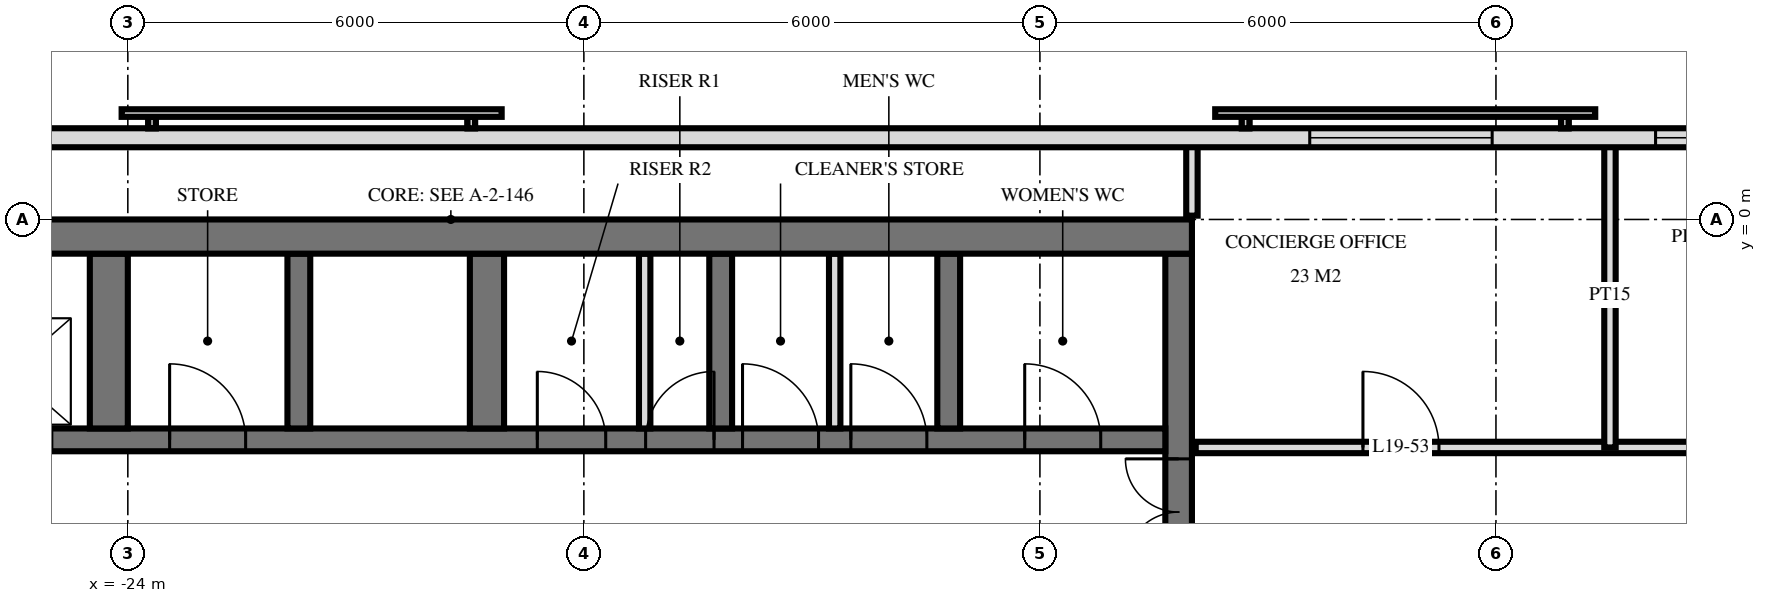
"""IFC4 building model, lengths in metres.
Left out: names, types, materials, properties, quantities, classifications, styles, units other than length and angle.
Written with IfcOpenShell. Run it as: python <this file> out.ifc"""

import sys

from ifc_helpers import new_model, si_unit, direction, frame, frame_2d, origin, place, context, subcontext, project, spatial, rectangle, extrude, element, fill, save


model = new_model("IFC4")
c1 = context("Model", 3, precision=1e-05, world=origin(), true_north=direction((0.0, 1.0)))
c2 = subcontext(c1, "Body", "Model", "MODEL_VIEW")
j1 = project(units=[si_unit("LENGTHUNIT", "METRE"), si_unit("PLANEANGLEUNIT", "RADIAN")], contexts=[c1])
p1 = place(None, origin())
s1 = spatial("IfcSite", under=j1, at=p1, CompositionType="ELEMENT")
p2 = place(p1, origin())
s2 = spatial("IfcBuilding", under=s1, at=p2, CompositionType="ELEMENT")
p3 = place(p2, frame((0.0, 0.0, 78.0)))
s3 = spatial("IfcBuildingStorey", under=s2, at=p3, CompositionType="ELEMENT", Elevation=78.0)
p4 = place(p3, frame((-29.5, -0.225, 0.0), z_axis=(0.0, 0.0, 1.0), x_axis=(1.0, 0.0, 0.0)))
e1 = element("IfcWall", 1, at=p4, inside=s3, PredefinedType="SHEAR", context=c2, shape_type="SweptSolid", body=[
    extrude(rectangle(XDim=19.5, YDim=0.45, at=frame_2d((9.75, 0.0))), origin(), (0.0, 0.0, 1.0), 3.6),
])
p5 = place(p3, frame((-10.175, -14.55, 0.0), z_axis=(0.0, 0.0, 1.0), x_axis=(0.0, 1.0, 0.0)))
e2 = element("IfcWall", 2, at=p5, inside=s3, PredefinedType="SHEAR", context=c2, shape_type="SweptSolid", body=[
    extrude(rectangle(XDim=14.1, YDim=0.35, at=frame_2d((7.05, 0.0))), origin(), (0.0, 0.0, 1.0), 3.6),
])
p6 = place(p5, frame((8.4, 0.0, 0.0)))
e3 = element("IfcOpeningElement", 3, at=p6, cuts=e2, PredefinedType="OPENING", context=c2, shape_type="SweptSolid", body=[
    extrude(rectangle(XDim=1.4, YDim=2.4, at=frame_2d((0.7, 1.2))), frame((0.0, 0.185, 0.0), z_axis=(0.0, -1.0, 0.0), x_axis=(1.0, 0.0, 0.0)), (0.0, 0.0, 1.0), 0.37),
])
p7 = place(p5, frame((10.0, 0.0, 0.0)))
e4 = element("IfcOpeningElement", 4, at=p7, cuts=e2, PredefinedType="OPENING", context=c2, shape_type="SweptSolid", body=[
    extrude(rectangle(XDim=1.4, YDim=2.4, at=frame_2d((0.7, 1.2))), frame((0.0, 0.185, 0.0), z_axis=(0.0, -1.0, 0.0), x_axis=(1.0, 0.0, 0.0)), (0.0, 0.0, 1.0), 0.37),
])
p8 = place(p5, frame((4.0, 0.0, 0.0)))
e5 = element("IfcOpeningElement", 5, at=p8, cuts=e2, PredefinedType="OPENING", context=c2, shape_type="SweptSolid", body=[
    extrude(rectangle(XDim=1.2, YDim=2.1, at=frame_2d((0.6, 1.05))), frame((0.0, 0.185, 0.0), z_axis=(0.0, -1.0, 0.0), x_axis=(1.0, 0.0, 0.0)), (0.0, 0.0, 1.0), 0.37),
])
p9 = place(p3, frame((-29.05, -2.9, 0.0), z_axis=(0.0, 0.0, 1.0), x_axis=(1.0, 0.0, 0.0)))
e6 = element("IfcWall", 6, at=p9, inside=s3, PredefinedType="SHEAR", context=c2, shape_type="SweptSolid", body=[
    extrude(rectangle(XDim=18.7, YDim=0.3, at=frame_2d((9.35, 0.0))), origin(), (0.0, 0.0, 1.0), 3.6),
])
p10 = place(p9, frame((2.95, 0.0, 0.0)))
e7 = element("IfcOpeningElement", 7, at=p10, cuts=e6, PredefinedType="OPENING", context=c2, shape_type="SweptSolid", body=[
    extrude(rectangle(XDim=1.1, YDim=2.1, at=frame_2d((0.55, 1.05))), frame((0.0, 0.16, 0.0), z_axis=(0.0, -1.0, 0.0), x_axis=(1.0, 0.0, 0.0)), (0.0, 0.0, 1.0), 0.32),
])
p11 = place(p9, frame((0.55, 0.0, 0.0)))
e8 = element("IfcOpeningElement", 8, at=p11, cuts=e6, PredefinedType="OPENING", context=c2, shape_type="SweptSolid", body=[
    extrude(rectangle(XDim=1.1, YDim=2.1, at=frame_2d((0.55, 1.05))), frame((0.0, 0.16, 0.0), z_axis=(0.0, -1.0, 0.0), x_axis=(1.0, 0.0, 0.0)), (0.0, 0.0, 1.0), 0.32),
])
p12 = place(p9, frame((11.863, 0.0, 0.0)))
e9 = element("IfcOpeningElement", 9, at=p12, cuts=e6, PredefinedType="OPENING", context=c2, shape_type="SweptSolid", body=[
    extrude(rectangle(XDim=0.9, YDim=2.1, at=frame_2d((0.45, 1.05))), frame((0.0, 0.16, 0.0), z_axis=(0.0, -1.0, 0.0), x_axis=(1.0, 0.0, 0.0)), (0.0, 0.0, 1.0), 0.32),
])
p13 = place(p9, frame((10.438, 0.0, 0.0)))
e10 = element("IfcOpeningElement", 10, at=p13, cuts=e6, PredefinedType="OPENING", context=c2, shape_type="SweptSolid", body=[
    extrude(rectangle(XDim=0.9, YDim=2.1, at=frame_2d((0.45, 1.05))), frame((0.0, 0.16, 0.0), z_axis=(0.0, -1.0, 0.0), x_axis=(1.0, 0.0, 0.0)), (0.0, 0.0, 1.0), 0.32),
])
p14 = place(p9, frame((16.85, 0.0, 0.0)))
e11 = element("IfcOpeningElement", 11, at=p14, cuts=e6, PredefinedType="OPENING", context=c2, shape_type="SweptSolid", body=[
    extrude(rectangle(XDim=1.0, YDim=2.1, at=frame_2d((0.5, 1.05))), frame((0.0, 0.16, 0.0), z_axis=(0.0, -1.0, 0.0), x_axis=(1.0, 0.0, 0.0)), (0.0, 0.0, 1.0), 0.32),
])
p15 = place(p9, frame((14.562, 0.0, 0.0)))
e12 = element("IfcOpeningElement", 12, at=p15, cuts=e6, PredefinedType="OPENING", context=c2, shape_type="SweptSolid", body=[
    extrude(rectangle(XDim=1.0, YDim=2.1, at=frame_2d((0.5, 1.05))), frame((0.0, 0.16, 0.0), z_axis=(0.0, -1.0, 0.0), x_axis=(1.0, 0.0, 0.0)), (0.0, 0.0, 1.0), 0.32),
])
p16 = place(p9, frame((13.137, 0.0, 0.0)))
e13 = element("IfcOpeningElement", 13, at=p16, cuts=e6, PredefinedType="OPENING", context=c2, shape_type="SweptSolid", body=[
    extrude(rectangle(XDim=1.0, YDim=2.1, at=frame_2d((0.5, 1.05))), frame((0.0, 0.16, 0.0), z_axis=(0.0, -1.0, 0.0), x_axis=(1.0, 0.0, 0.0)), (0.0, 0.0, 1.0), 0.32),
])
p17 = place(p9, frame((5.6, 0.0, 0.0)))
e14 = element("IfcOpeningElement", 14, at=p17, cuts=e6, PredefinedType="OPENING", context=c2, shape_type="SweptSolid", body=[
    extrude(rectangle(XDim=1.0, YDim=2.1, at=frame_2d((0.5, 1.05))), frame((0.0, 0.16, 0.0), z_axis=(0.0, -1.0, 0.0), x_axis=(1.0, 0.0, 0.0)), (0.0, 0.0, 1.0), 0.32),
])
for number, where, z_axis, x_axis in (
    (15, (-13.2, -2.75, 0.0), (0.0, 0.0, 1.0), (0.0, 1.0, 0.0)),
    (16, (-16.2, -2.75, 0.0), (0.0, 0.0, 1.0), (0.0, 1.0, 0.0)),
):
    element("IfcWall", number, at=place(p3, frame(where, z_axis=z_axis, x_axis=x_axis)), inside=s3, PredefinedType="SHEAR", context=c2, shape_type="SweptSolid", body=[
        extrude(rectangle(XDim=2.3, YDim=0.3, at=frame_2d((1.15, 0.0))), origin(), (0.0, 0.0, 1.0), 3.6),
    ])
p18 = place(p3, frame((-19.275, -2.75, 0.0), z_axis=(0.0, 0.0, 1.0), x_axis=(0.0, 1.0, 0.0)))
e17 = element("IfcWall", 17, at=p18, inside=s3, PredefinedType="SHEAR", context=c2, shape_type="SweptSolid", body=[
    extrude(rectangle(XDim=2.3, YDim=0.45, at=frame_2d((1.15, 0.0))), origin(), (0.0, 0.0, 1.0), 3.6),
])
p19 = place(p3, frame((-21.75, -2.75, 0.0), z_axis=(0.0, 0.0, 1.0), x_axis=(0.0, 1.0, 0.0)))
e18 = element("IfcWall", 18, at=p19, inside=s3, PredefinedType="SHEAR", context=c2, shape_type="SweptSolid", body=[
    extrude(rectangle(XDim=2.3, YDim=0.3, at=frame_2d((1.15, 0.0))), origin(), (0.0, 0.0, 1.0), 3.6),
])
p20 = place(p3, frame((-24.25, -2.75, 0.0), z_axis=(0.0, 0.0, 1.0), x_axis=(0.0, 1.0, 0.0)))
e19 = element("IfcWall", 19, at=p20, inside=s3, PredefinedType="SHEAR", context=c2, shape_type="SweptSolid", body=[
    extrude(rectangle(XDim=2.3, YDim=0.5, at=frame_2d((1.15, 0.0))), origin(), (0.0, 0.0, 1.0), 3.6),
])
p21 = place(p3, frame((28.775, 1.075, 0.0), z_axis=(0.0, 0.0, 1.0), x_axis=(-1.0, 0.0, 0.0)))
e20 = element("IfcWall", 20, at=p21, inside=s3, PredefinedType="SOLIDWALL", context=c2, shape_type="SweptSolid", body=[
    extrude(rectangle(XDim=57.551, YDim=0.25, at=frame_2d((28.775, 0.0))), origin(), (0.0, 0.0, 1.0), 3.32),
])
p22 = place(p21, frame((25.325, 0.0, 0.3)))
e21 = element("IfcOpeningElement", 21, at=p22, cuts=e20, PredefinedType="OPENING", context=c2, shape_type="SweptSolid", body=[
    extrude(rectangle(XDim=2.4, YDim=2.1, at=frame_2d((1.2, 1.05))), frame((0.0, 0.135, 0.0), z_axis=(0.0, -1.0, 0.0), x_axis=(1.0, 0.0, 0.0)), (0.0, 0.0, 1.0), 0.27),
])
p23 = place(p21, frame((30.275, 0.0, 0.3)))
e22 = element("IfcOpeningElement", 22, at=p23, cuts=e20, PredefinedType="OPENING", context=c2, shape_type="SweptSolid", body=[
    extrude(rectangle(XDim=2.4, YDim=2.1, at=frame_2d((1.2, 1.05))), frame((0.0, 0.135, 0.0), z_axis=(0.0, -1.0, 0.0), x_axis=(1.0, 0.0, 0.0)), (0.0, 0.0, 1.0), 0.27),
])
p24 = place(p21, frame((34.825, 0.0, 0.3)))
e23 = element("IfcOpeningElement", 23, at=p24, cuts=e20, PredefinedType="OPENING", context=c2, shape_type="SweptSolid", body=[
    extrude(rectangle(XDim=2.4, YDim=2.1, at=frame_2d((1.2, 1.05))), frame((0.0, 0.135, 0.0), z_axis=(0.0, -1.0, 0.0), x_axis=(1.0, 0.0, 0.0)), (0.0, 0.0, 1.0), 0.27),
])
for number, where, z_axis, x_axis in (
    (24, (-17.2, -2.75, 0.0), (0.0, 0.0, 1.0), (0.0, 1.0, 0.0)),
    (25, (-14.7, -2.75, 0.0), (0.0, 0.0, 1.0), (0.0, 1.0, 0.0)),
):
    element("IfcWall", number, at=place(p3, frame(where, z_axis=z_axis, x_axis=x_axis)), inside=s3, PredefinedType="PARTITIONING", context=c2, shape_type="SweptSolid", body=[
        extrude(rectangle(XDim=2.3, YDim=0.15, at=frame_2d((1.15, 0.0))), origin(), (0.0, 0.0, 1.0), 3.3),
    ])
p25 = place(p3, frame((-4.5, -3.0, 0.0), z_axis=(0.0, 0.0, 1.0), x_axis=(0.0, 1.0, 0.0)))
e26 = element("IfcWall", 26, at=p25, inside=s3, PredefinedType="PARTITIONING", context=c2, shape_type="SweptSolid", body=[
    extrude(rectangle(XDim=4.02, YDim=0.15, at=frame_2d((2.01, 0.0))), origin(), (0.0, 0.0, 1.0), 3.32),
])
p26 = place(p3, frame((-10.0, 0.05, 0.0), z_axis=(0.0, 0.0, 1.0), x_axis=(0.0, 1.0, 0.0)))
e27 = element("IfcWall", 27, at=p26, inside=s3, PredefinedType="PARTITIONING", context=c2, shape_type="SweptSolid", body=[
    extrude(rectangle(XDim=0.97, YDim=0.15, at=frame_2d((0.485, 0.0))), origin(), (0.0, 0.0, 1.0), 3.32),
])
p27 = place(p3, frame((-9.95, -3.0, 0.0), z_axis=(0.0, 0.0, 1.0), x_axis=(1.0, 0.0, 0.0)))
e28 = element("IfcWall", 28, at=p27, inside=s3, PredefinedType="PARTITIONING", context=c2, shape_type="SweptSolid", body=[
    extrude(rectangle(XDim=19.9, YDim=0.15, at=frame_2d((9.95, 0.0))), origin(), (0.0, 0.0, 1.0), 3.32),
])
p28 = place(p27, frame((2.2, 0.0, 0.0)))
e29 = element("IfcOpeningElement", 29, at=p28, cuts=e28, PredefinedType="OPENING", context=c2, shape_type="SweptSolid", body=[
    extrude(rectangle(XDim=1.0, YDim=2.1, at=frame_2d((0.5, 1.05))), frame((0.0, 0.085, 0.0), z_axis=(0.0, -1.0, 0.0), x_axis=(1.0, 0.0, 0.0)), (0.0, 0.0, 1.0), 0.17),
])
p29 = place(p27, frame((7.2, 0.0, 0.0)))
e30 = element("IfcOpeningElement", 30, at=p29, cuts=e28, PredefinedType="OPENING", context=c2, shape_type="SweptSolid", body=[
    extrude(rectangle(XDim=1.0, YDim=2.1, at=frame_2d((0.5, 1.05))), frame((0.0, 0.085, 0.0), z_axis=(0.0, -1.0, 0.0), x_axis=(1.0, 0.0, 0.0)), (0.0, 0.0, 1.0), 0.17),
])
p30 = place(p27, frame((11.7, 0.0, 0.0)))
e31 = element("IfcOpeningElement", 31, at=p30, cuts=e28, PredefinedType="OPENING", context=c2, shape_type="SweptSolid", body=[
    extrude(rectangle(XDim=1.0, YDim=2.1, at=frame_2d((0.5, 1.05))), frame((0.0, 0.085, 0.0), z_axis=(0.0, -1.0, 0.0), x_axis=(1.0, 0.0, 0.0)), (0.0, 0.0, 1.0), 0.17),
])
p31 = place(p27, frame((15.45, 0.0, 0.0)))
e32 = element("IfcOpeningElement", 32, at=p31, cuts=e28, PredefinedType="OPENING", context=c2, shape_type="SweptSolid", body=[
    extrude(rectangle(XDim=1.0, YDim=2.1, at=frame_2d((0.5, 1.05))), frame((0.0, 0.085, 0.0), z_axis=(0.0, -1.0, 0.0), x_axis=(1.0, 0.0, 0.0)), (0.0, 0.0, 1.0), 0.17),
])
p32 = place(p27, frame((18.2, 0.0, 0.0)))
e33 = element("IfcOpeningElement", 33, at=p32, cuts=e28, PredefinedType="OPENING", context=c2, shape_type="SweptSolid", body=[
    extrude(rectangle(XDim=1.0, YDim=2.1, at=frame_2d((0.5, 1.05))), frame((0.0, 0.085, 0.0), z_axis=(0.0, -1.0, 0.0), x_axis=(1.0, 0.0, 0.0)), (0.0, 0.0, 1.0), 0.17),
])
p33 = place(p23, origin())
e34 = element("IfcWindow", 34, at=p33, inside=s3, PartitioningType="SINGLE_PANEL", PredefinedType="WINDOW", context=c2, shape_type="SweptSolid", body=[
    extrude(rectangle(XDim=2.4, YDim=2.1, at=frame_2d((1.2, 1.05))), frame((0.0, 0.03, 0.0), z_axis=(0.0, -1.0, 0.0), x_axis=(1.0, 0.0, 0.0)), (0.0, 0.0, 1.0), 0.06),
])
fill(e22, e34)
p34 = place(p24, origin())
e35 = element("IfcWindow", 35, at=p34, inside=s3, PartitioningType="SINGLE_PANEL", PredefinedType="WINDOW", context=c2, shape_type="SweptSolid", body=[
    extrude(rectangle(XDim=2.4, YDim=2.1, at=frame_2d((1.2, 1.05))), frame((0.0, 0.03, 0.0), z_axis=(0.0, -1.0, 0.0), x_axis=(1.0, 0.0, 0.0)), (0.0, 0.0, 1.0), 0.06),
])
fill(e23, e35)
p35 = place(p7, origin())
e36 = element("IfcDoor", 36, at=p35, inside=s3, OperationType="DOUBLE_DOOR_SINGLE_SWING", PredefinedType="DOOR", context=c2, shape_type="SweptSolid", body=[
    extrude(rectangle(XDim=1.4, YDim=2.4, at=frame_2d((0.7, 1.2))), frame((0.0, 0.025, 0.0), z_axis=(0.0, -1.0, 0.0), x_axis=(1.0, 0.0, 0.0)), (0.0, 0.0, 1.0), 0.05),
])
fill(e4, e36)
p36 = place(p12, origin())
e37 = element("IfcDoor", 37, at=p36, inside=s3, OperationType="SINGLE_SWING_LEFT", PredefinedType="DOOR", context=c2, shape_type="SweptSolid", body=[
    extrude(rectangle(XDim=0.9, YDim=2.1, at=frame_2d((0.45, 1.05))), frame((0.0, 0.025, 0.0), z_axis=(0.0, -1.0, 0.0), x_axis=(1.0, 0.0, 0.0)), (0.0, 0.0, 1.0), 0.05),
])
fill(e9, e37)
p37 = place(p13, origin())
e38 = element("IfcDoor", 38, at=p37, inside=s3, OperationType="SINGLE_SWING_RIGHT", PredefinedType="DOOR", context=c2, shape_type="SweptSolid", body=[
    extrude(rectangle(XDim=0.9, YDim=2.1, at=frame_2d((0.45, 1.05))), frame((0.0, 0.025, 0.0), z_axis=(0.0, -1.0, 0.0), x_axis=(1.0, 0.0, 0.0)), (0.0, 0.0, 1.0), 0.05),
])
fill(e10, e38)
p38 = place(p14, origin())
e39 = element("IfcDoor", 39, at=p38, inside=s3, OperationType="SINGLE_SWING_RIGHT", PredefinedType="DOOR", context=c2, shape_type="SweptSolid", body=[
    extrude(rectangle(XDim=1.0, YDim=2.1, at=frame_2d((0.5, 1.05))), frame((0.0, 0.025, 0.0), z_axis=(0.0, -1.0, 0.0), x_axis=(1.0, 0.0, 0.0)), (0.0, 0.0, 1.0), 0.05),
])
fill(e11, e39)
p39 = place(p15, origin())
e40 = element("IfcDoor", 40, at=p39, inside=s3, OperationType="SINGLE_SWING_RIGHT", PredefinedType="DOOR", context=c2, shape_type="SweptSolid", body=[
    extrude(rectangle(XDim=1.0, YDim=2.1, at=frame_2d((0.5, 1.05))), frame((0.0, 0.025, 0.0), z_axis=(0.0, -1.0, 0.0), x_axis=(1.0, 0.0, 0.0)), (0.0, 0.0, 1.0), 0.05),
])
fill(e12, e40)
p40 = place(p16, origin())
e41 = element("IfcDoor", 41, at=p40, inside=s3, OperationType="SINGLE_SWING_RIGHT", PredefinedType="DOOR", context=c2, shape_type="SweptSolid", body=[
    extrude(rectangle(XDim=1.0, YDim=2.1, at=frame_2d((0.5, 1.05))), frame((0.0, 0.025, 0.0), z_axis=(0.0, -1.0, 0.0), x_axis=(1.0, 0.0, 0.0)), (0.0, 0.0, 1.0), 0.05),
])
fill(e13, e41)
p41 = place(p17, origin())
e42 = element("IfcDoor", 42, at=p41, inside=s3, OperationType="SINGLE_SWING_RIGHT", PredefinedType="DOOR", context=c2, shape_type="SweptSolid", body=[
    extrude(rectangle(XDim=1.0, YDim=2.1, at=frame_2d((0.5, 1.05))), frame((0.0, 0.025, 0.0), z_axis=(0.0, -1.0, 0.0), x_axis=(1.0, 0.0, 0.0)), (0.0, 0.0, 1.0), 0.05),
])
fill(e14, e42)
p42 = place(p28, origin())
e43 = element("IfcDoor", 43, at=p42, inside=s3, OperationType="SINGLE_SWING_RIGHT", PredefinedType="DOOR", context=c2, shape_type="SweptSolid", body=[
    extrude(rectangle(XDim=1.0, YDim=2.1, at=frame_2d((0.5, 1.05))), frame((0.0, 0.025, 0.0), z_axis=(0.0, -1.0, 0.0), x_axis=(1.0, 0.0, 0.0)), (0.0, 0.0, 1.0), 0.05),
])
fill(e29, e43)
save(model, sys.argv[1])
